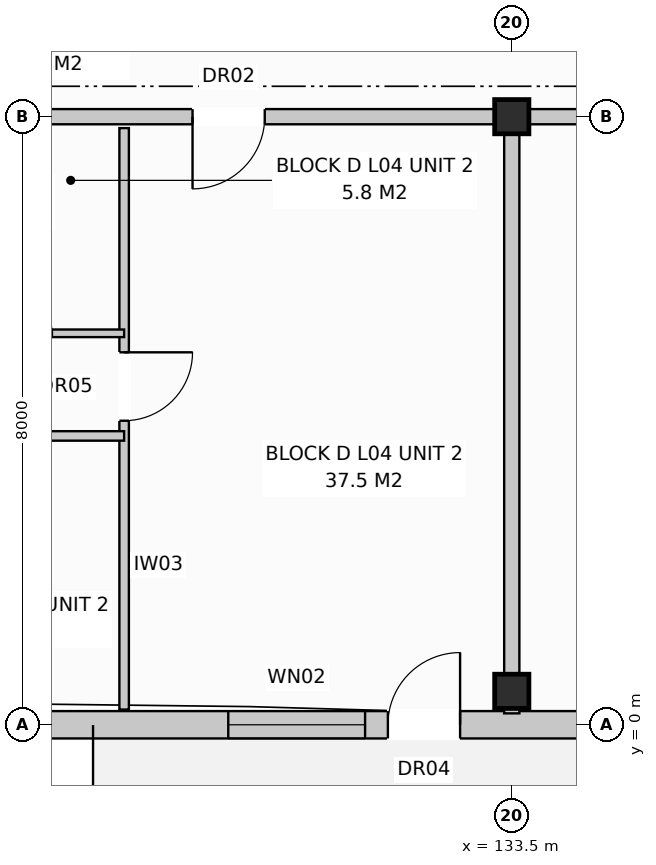
"""IFC4 building model, lengths in metres.
Left out: names, types, materials, properties, quantities, classifications, styles, units other than length and angle.
Written with IfcOpenShell. Run it as: python <this file> out.ifc"""

import sys

from ifc_helpers import new_model, si_unit, direction, frame, frame_2d, origin, origin_with_axes, origin_2d, place, context, subcontext, project, spatial, rectangle, extrude, element, fill, save


model = new_model("IFC4")
c1 = context("Model", 3, precision=1e-05, world=origin(), true_north=direction((0.0, 1.0)))
c2 = subcontext(c1, "Body", "Model", "MODEL_VIEW")
j1 = project(units=[si_unit("LENGTHUNIT", "METRE"), si_unit("PLANEANGLEUNIT", "RADIAN")], contexts=[c1])
p1 = place(None, origin())
s1 = spatial("IfcSite", under=j1, at=p1, CompositionType="ELEMENT")
p2 = place(p1, origin())
s2 = spatial("IfcBuilding", under=s1, at=p2, CompositionType="ELEMENT")
p3 = place(p2, frame((0.0, 0.0, 14.4)))
s3 = spatial("IfcBuildingStorey", under=s2, at=p3, CompositionType="ELEMENT", Elevation=14.4)
for number, where, z_axis, x_axis in (
    (1, (133.5, 0.44, 0.0), (0.0, 0.0, 1.0), (1.0, 0.0, 0.0)),
    (2, (133.5, 8.0, 0.0), (0.0, 0.0, 1.0), (1.0, 0.0, 0.0)),
):
    element("IfcColumn", number, at=place(p3, frame(where, z_axis=z_axis, x_axis=x_axis)), inside=s3, PredefinedType="COLUMN", context=c2, shape_type="SweptSolid", body=[
        extrude(rectangle(XDim=0.45, YDim=0.45, at=origin_2d()), origin(), (0.0, 0.0, 1.0), 3.2),
    ])
p4 = place(p3, frame((112.97, 0.0, 0.0), z_axis=(0.0, 0.0, 1.0), x_axis=(1.0, 0.0, 0.0)))
e3 = element("IfcWall", 3, at=p4, inside=s3, PredefinedType="STANDARD", context=c2, shape_type="SweptSolid", body=[
    extrude(rectangle(XDim=54.86, YDim=0.36, at=frame_2d((27.43, 0.0))), origin(), (0.0, 0.0, 1.0), 2.94),
])
p5 = place(p4, frame((5.127, 0.0, 0.0)))
e4 = element("IfcOpeningElement", 4, at=p5, cuts=e3, PredefinedType="OPENING", context=c2, shape_type="SweptSolid", body=[
    extrude(rectangle(XDim=0.95, YDim=2.1, at=frame_2d((0.475, 1.05))), frame((0.0, 0.192, 0.0), z_axis=(0.0, -1.0, 0.0), x_axis=(1.0, 0.0, 0.0)), (0.0, 0.0, 1.0), 0.384),
])
p6 = place(p4, frame((18.9, 0.0, 0.0)))
e5 = element("IfcOpeningElement", 5, at=p6, cuts=e3, PredefinedType="OPENING", context=c2, shape_type="SweptSolid", body=[
    extrude(rectangle(XDim=0.95, YDim=2.1, at=frame_2d((0.475, 1.05))), frame((0.0, 0.192, 0.0), z_axis=(0.0, -1.0, 0.0), x_axis=(1.0, 0.0, 0.0)), (0.0, 0.0, 1.0), 0.384),
])
p7 = place(p4, frame((32.7, 0.0, 0.0)))
e6 = element("IfcOpeningElement", 6, at=p7, cuts=e3, PredefinedType="OPENING", context=c2, shape_type="SweptSolid", body=[
    extrude(rectangle(XDim=0.95, YDim=2.1, at=frame_2d((0.475, 1.05))), frame((0.0, 0.192, 0.0), z_axis=(0.0, -1.0, 0.0), x_axis=(1.0, 0.0, 0.0)), (0.0, 0.0, 1.0), 0.384),
])
p8 = place(p4, frame((44.591, 0.0, 0.0)))
e7 = element("IfcOpeningElement", 7, at=p8, cuts=e3, PredefinedType="OPENING", context=c2, shape_type="SweptSolid", body=[
    extrude(rectangle(XDim=0.95, YDim=2.1, at=frame_2d((0.475, 1.05))), frame((0.0, 0.192, 0.0), z_axis=(0.0, -1.0, 0.0), x_axis=(1.0, 0.0, 0.0)), (0.0, 0.0, 1.0), 0.384),
])
p9 = place(p4, frame((0.9, 0.0, 0.8)))
e8 = element("IfcOpeningElement", 8, at=p9, cuts=e3, PredefinedType="OPENING", context=c2, shape_type="SweptSolid", body=[
    extrude(rectangle(XDim=1.8, YDim=1.7, at=frame_2d((0.9, 0.85))), frame((0.0, 0.192, 0.0), z_axis=(0.0, -1.0, 0.0), x_axis=(1.0, 0.0, 0.0)), (0.0, 0.0, 1.0), 0.384),
])
p10 = place(p4, frame((8.35, 0.0, 0.72)))
e9 = element("IfcOpeningElement", 9, at=p10, cuts=e3, PredefinedType="OPENING", context=c2, shape_type="SweptSolid", body=[
    extrude(rectangle(XDim=1.1, YDim=1.5, at=frame_2d((0.55, 0.75))), frame((0.0, 0.192, 0.0), z_axis=(0.0, -1.0, 0.0), x_axis=(1.0, 0.0, 0.0)), (0.0, 0.0, 1.0), 0.384),
])
p11 = place(p4, frame((11.225, 0.0, 0.8)))
e10 = element("IfcOpeningElement", 10, at=p11, cuts=e3, PredefinedType="OPENING", context=c2, shape_type="SweptSolid", body=[
    extrude(rectangle(XDim=1.95, YDim=1.65, at=frame_2d((0.975, 0.825))), frame((0.0, 0.192, 0.0), z_axis=(0.0, -1.0, 0.0), x_axis=(1.0, 0.0, 0.0)), (0.0, 0.0, 1.0), 0.384),
])
p12 = place(p4, frame((16.8, 0.0, 0.8)))
e11 = element("IfcOpeningElement", 11, at=p12, cuts=e3, PredefinedType="OPENING", context=c2, shape_type="SweptSolid", body=[
    extrude(rectangle(XDim=1.8, YDim=1.7, at=frame_2d((0.9, 0.85))), frame((0.0, 0.192, 0.0), z_axis=(0.0, -1.0, 0.0), x_axis=(1.0, 0.0, 0.0)), (0.0, 0.0, 1.0), 0.384),
])
p13 = place(p4, frame((22.25, 0.0, 0.72)))
e12 = element("IfcOpeningElement", 12, at=p13, cuts=e3, PredefinedType="OPENING", context=c2, shape_type="SweptSolid", body=[
    extrude(rectangle(XDim=1.9, YDim=1.85, at=frame_2d((0.95, 0.925))), frame((0.0, 0.192, 0.0), z_axis=(0.0, -1.0, 0.0), x_axis=(1.0, 0.0, 0.0)), (0.0, 0.0, 1.0), 0.384),
])
p14 = place(p4, frame((28.35, 0.0, 0.72)))
e13 = element("IfcOpeningElement", 13, at=p14, cuts=e3, PredefinedType="OPENING", context=c2, shape_type="SweptSolid", body=[
    extrude(rectangle(XDim=1.1, YDim=1.5, at=frame_2d((0.55, 0.75))), frame((0.0, 0.192, 0.0), z_axis=(0.0, -1.0, 0.0), x_axis=(1.0, 0.0, 0.0)), (0.0, 0.0, 1.0), 0.384),
])
p15 = place(p4, frame((30.6, 0.0, 0.8)))
e14 = element("IfcOpeningElement", 14, at=p15, cuts=e3, PredefinedType="OPENING", context=c2, shape_type="SweptSolid", body=[
    extrude(rectangle(XDim=1.8, YDim=1.7, at=frame_2d((0.9, 0.85))), frame((0.0, 0.192, 0.0), z_axis=(0.0, -1.0, 0.0), x_axis=(1.0, 0.0, 0.0)), (0.0, 0.0, 1.0), 0.384),
])
p16 = place(p4, frame((36.55, 0.0, 0.8)))
e15 = element("IfcOpeningElement", 15, at=p16, cuts=e3, PredefinedType="OPENING", context=c2, shape_type="SweptSolid", body=[
    extrude(rectangle(XDim=1.9, YDim=1.85, at=frame_2d((0.95, 0.925))), frame((0.0, 0.192, 0.0), z_axis=(0.0, -1.0, 0.0), x_axis=(1.0, 0.0, 0.0)), (0.0, 0.0, 1.0), 0.384),
])
p17 = place(p4, frame((42.65, 0.0, 0.72)))
e16 = element("IfcOpeningElement", 16, at=p17, cuts=e3, PredefinedType="OPENING", context=c2, shape_type="SweptSolid", body=[
    extrude(rectangle(XDim=1.1, YDim=1.5, at=frame_2d((0.55, 0.75))), frame((0.0, 0.192, 0.0), z_axis=(0.0, -1.0, 0.0), x_axis=(1.0, 0.0, 0.0)), (0.0, 0.0, 1.0), 0.384),
])
p18 = place(p4, frame((48.7, 0.0, 0.8)))
e17 = element("IfcOpeningElement", 17, at=p18, cuts=e3, PredefinedType="OPENING", context=c2, shape_type="SweptSolid", body=[
    extrude(rectangle(XDim=1.8, YDim=1.7, at=frame_2d((0.9, 0.85))), frame((0.0, 0.192, 0.0), z_axis=(0.0, -1.0, 0.0), x_axis=(1.0, 0.0, 0.0)), (0.0, 0.0, 1.0), 0.384),
])
p19 = place(p4, frame((52.45, 0.0, 0.72)))
e18 = element("IfcOpeningElement", 18, at=p19, cuts=e3, PredefinedType="OPENING", context=c2, shape_type="SweptSolid", body=[
    extrude(rectangle(XDim=1.1, YDim=1.5, at=frame_2d((0.55, 0.75))), frame((0.0, 0.192, 0.0), z_axis=(0.0, -1.0, 0.0), x_axis=(1.0, 0.0, 0.0)), (0.0, 0.0, 1.0), 0.384),
])
p20 = place(p3, frame((133.5, 7.85, 0.0), z_axis=(0.0, 0.0, 1.0), x_axis=(0.0, -1.0, 0.0)))
e19 = element("IfcWall", 19, at=p20, inside=s3, PredefinedType="PARTITIONING", context=c2, shape_type="SweptSolid", body=[
    extrude(rectangle(XDim=7.7, YDim=0.2, at=frame_2d((3.85, 0.0))), origin(), (0.0, 0.0, 1.0), 2.38),
])
p21 = place(p3, frame((119.7, 8.0, 0.0), z_axis=(0.0, 0.0, 1.0), x_axis=(1.0, 0.0, 0.0)))
e20 = element("IfcWall", 20, at=p21, inside=s3, PredefinedType="PARTITIONING", context=c2, shape_type="SweptSolid", body=[
    extrude(rectangle(XDim=13.8, YDim=0.2, at=frame_2d((6.9, 0.0))), origin(), (0.0, 0.0, 1.0), 2.38),
])
p22 = place(p21, frame((9.6, 0.0, 0.0)))
e21 = element("IfcOpeningElement", 21, at=p22, cuts=e20, PredefinedType="OPENING", context=c2, shape_type="SweptSolid", body=[
    extrude(rectangle(XDim=0.95, YDim=2.15, at=frame_2d((0.475, 1.075))), frame((0.0, 0.112, 0.0), z_axis=(0.0, -1.0, 0.0), x_axis=(1.0, 0.0, 0.0)), (0.0, 0.0, 1.0), 0.224),
])
p23 = place(p3, frame((128.4, 7.85, 0.0), z_axis=(0.0, 0.0, 1.0), x_axis=(0.0, -1.0, 0.0)))
e22 = element("IfcWall", 22, at=p23, inside=s3, PredefinedType="PARTITIONING", context=c2, shape_type="SweptSolid", body=[
    extrude(rectangle(XDim=7.65, YDim=0.125, at=frame_2d((3.825, 0.0))), origin(), (0.0, 0.0, 1.0), 2.94),
])
p24 = place(p23, frame((2.95, 0.0, 0.0)))
e23 = element("IfcOpeningElement", 23, at=p24, cuts=e22, PredefinedType="OPENING", context=c2, shape_type="SweptSolid", body=[
    extrude(rectangle(XDim=0.9, YDim=2.1, at=frame_2d((0.45, 1.05))), frame((0.0, 0.074, 0.0), z_axis=(0.0, -1.0, 0.0), x_axis=(1.0, 0.0, 0.0)), (0.0, 0.0, 1.0), 0.149),
])
p25 = place(p3, frame((119.8, 5.15, 0.0), z_axis=(0.0, 0.0, 1.0), x_axis=(1.0, 0.0, 0.0)))
e24 = element("IfcWall", 24, at=p25, inside=s3, PredefinedType="PARTITIONING", context=c2, shape_type="SweptSolid", body=[
    extrude(rectangle(XDim=8.6, YDim=0.1, at=frame_2d((4.3, 0.0))), origin(), (0.0, 0.0, 1.0), 2.94),
])
p26 = place(p25, frame((1.4, 0.0, 0.0)))
e25 = element("IfcOpeningElement", 25, at=p26, cuts=e24, PredefinedType="OPENING", context=c2, shape_type="SweptSolid", body=[
    extrude(rectangle(XDim=0.85, YDim=2.05, at=frame_2d((0.425, 1.025))), frame((0.0, 0.062, 0.0), z_axis=(0.0, -1.0, 0.0), x_axis=(1.0, 0.0, 0.0)), (0.0, 0.0, 1.0), 0.124),
])
p27 = place(p25, frame((4.65, 0.0, 0.0)))
e26 = element("IfcOpeningElement", 26, at=p27, cuts=e24, PredefinedType="OPENING", context=c2, shape_type="SweptSolid", body=[
    extrude(rectangle(XDim=0.85, YDim=2.05, at=frame_2d((0.425, 1.025))), frame((0.0, 0.062, 0.0), z_axis=(0.0, -1.0, 0.0), x_axis=(1.0, 0.0, 0.0)), (0.0, 0.0, 1.0), 0.124),
])
p28 = place(p25, frame((6.8, 0.0, 0.0)))
e27 = element("IfcOpeningElement", 27, at=p28, cuts=e24, PredefinedType="OPENING", context=c2, shape_type="SweptSolid", body=[
    extrude(rectangle(XDim=0.85, YDim=2.1, at=frame_2d((0.425, 1.05))), frame((0.0, 0.062, 0.0), z_axis=(0.0, -1.0, 0.0), x_axis=(1.0, 0.0, 0.0)), (0.0, 0.0, 1.0), 0.124),
])
p29 = place(p3, frame((123.9, 3.8, 0.0), z_axis=(0.0, 0.0, 1.0), x_axis=(1.0, 0.0, 0.0)))
e28 = element("IfcWall", 28, at=p29, inside=s3, PredefinedType="PARTITIONING", context=c2, shape_type="SweptSolid", body=[
    extrude(rectangle(XDim=4.5, YDim=0.125, at=frame_2d((2.25, 0.0))), origin(), (0.0, 0.0, 1.0), 2.94),
])
p30 = place(p29, frame((1.6, 0.0, 0.0)))
e29 = element("IfcOpeningElement", 29, at=p30, cuts=e28, PredefinedType="OPENING", context=c2, shape_type="SweptSolid", body=[
    extrude(rectangle(XDim=0.9, YDim=2.1, at=frame_2d((0.45, 1.05))), frame((0.0, 0.074, 0.0), z_axis=(0.0, -1.0, 0.0), x_axis=(1.0, 0.0, 0.0)), (0.0, 0.0, 1.0), 0.149),
])
p31 = place(p3, frame((133.5, 8.0, 0.0), z_axis=(0.0, 0.0, 1.0), x_axis=(1.0, 0.0, 0.0)))
e30 = element("IfcWall", 30, at=p31, inside=s3, PredefinedType="PARTITIONING", context=c2, shape_type="SweptSolid", body=[
    extrude(rectangle(XDim=13.8, YDim=0.2, at=frame_2d((6.9, 0.0))), origin(), (0.0, 0.0, 1.0), 2.38),
])
p32 = place(p31, frame((2.4, 0.0, 0.0)))
e31 = element("IfcOpeningElement", 31, at=p32, cuts=e30, PredefinedType="OPENING", context=c2, shape_type="SweptSolid", body=[
    extrude(rectangle(XDim=0.95, YDim=2.15, at=frame_2d((0.475, 1.075))), frame((0.0, 0.112, 0.0), z_axis=(0.0, -1.0, 0.0), x_axis=(1.0, 0.0, 0.0)), (0.0, 0.0, 1.0), 0.224),
])
p33 = place(p6, origin_with_axes())
e32 = element("IfcDoor", 32, at=p33, inside=s3, OperationType="SINGLE_SWING_RIGHT", PredefinedType="DOOR", context=c2, shape_type="SweptSolid", body=[
    extrude(rectangle(XDim=0.95, YDim=2.1, at=frame_2d((0.475, 1.05))), frame((0.0, 0.025, 0.0), z_axis=(0.0, -1.0, 0.0), x_axis=(1.0, 0.0, 0.0)), (0.0, 0.0, 1.0), 0.05),
])
fill(e5, e32)
p34 = place(p12, origin_with_axes())
e33 = element("IfcWindow", 33, at=p34, inside=s3, PartitioningType="SINGLE_PANEL", PredefinedType="WINDOW", context=c2, shape_type="SweptSolid", body=[
    extrude(rectangle(XDim=1.8, YDim=1.7, at=frame_2d((0.9, 0.85))), frame((0.0, 0.03, 0.0), z_axis=(0.0, -1.0, 0.0), x_axis=(1.0, 0.0, 0.0)), (0.0, 0.0, 1.0), 0.06),
])
fill(e11, e33)
p35 = place(p22, frame((0.95, 0.0, 0.0), z_axis=(0.0, 0.0, 1.0), x_axis=(-1.0, 0.0, 0.0)))
e34 = element("IfcDoor", 34, at=p35, inside=s3, OperationType="SINGLE_SWING_LEFT", PredefinedType="DOOR", context=c2, shape_type="SweptSolid", body=[
    extrude(rectangle(XDim=0.95, YDim=2.15, at=frame_2d((0.475, 1.075))), frame((0.0, 0.025, 0.0), z_axis=(0.0, -1.0, 0.0), x_axis=(1.0, 0.0, 0.0)), (0.0, 0.0, 1.0), 0.05),
])
fill(e21, e34)
p36 = place(p24, origin_with_axes())
e35 = element("IfcDoor", 35, at=p36, inside=s3, OperationType="SINGLE_SWING_LEFT", PredefinedType="DOOR", context=c2, shape_type="SweptSolid", body=[
    extrude(rectangle(XDim=0.9, YDim=2.1, at=frame_2d((0.45, 1.05))), frame((0.0, 0.025, 0.0), z_axis=(0.0, -1.0, 0.0), x_axis=(1.0, 0.0, 0.0)), (0.0, 0.0, 1.0), 0.05),
])
fill(e23, e35)
p37 = place(p28, origin_with_axes())
e36 = element("IfcDoor", 36, at=p37, inside=s3, OperationType="SINGLE_SWING_LEFT", PredefinedType="DOOR", context=c2, shape_type="SweptSolid", body=[
    extrude(rectangle(XDim=0.85, YDim=2.1, at=frame_2d((0.425, 1.05))), frame((0.0, 0.025, 0.0), z_axis=(0.0, -1.0, 0.0), x_axis=(1.0, 0.0, 0.0)), (0.0, 0.0, 1.0), 0.05),
])
fill(e27, e36)
save(model, sys.argv[1])
